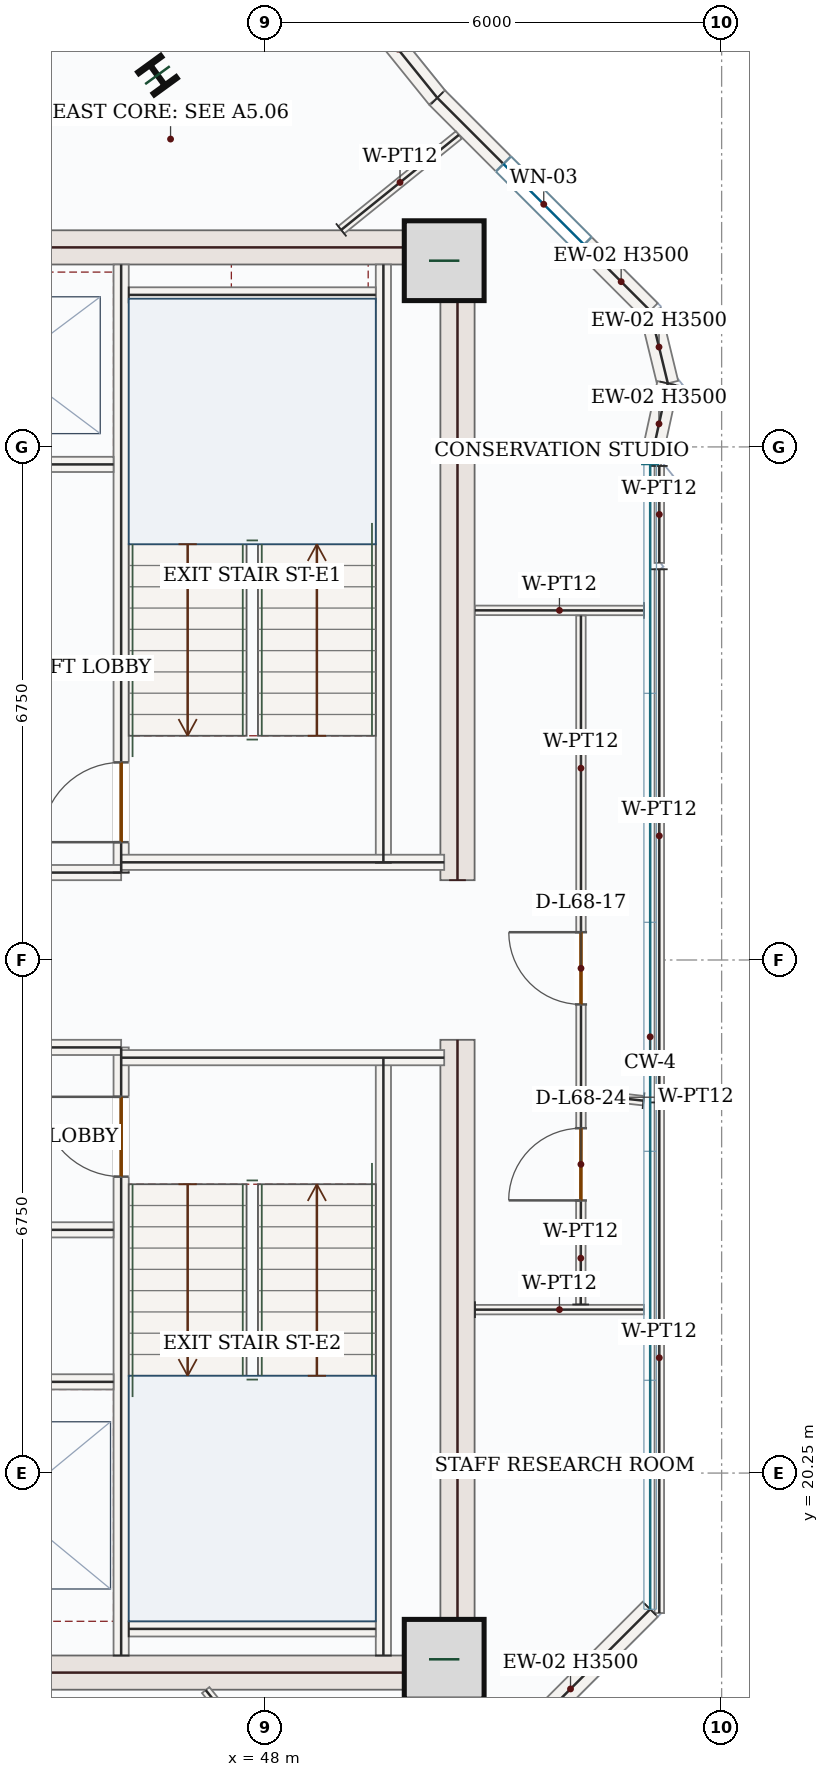
"""IFC4 building model, lengths in metres.
Left out: names, types, materials, properties, quantities, classifications, styles, units other than length and angle.
Written with IfcOpenShell. Run it as: python <this file> out.ifc"""

import sys

from ifc_helpers import new_model, si_unit, direction, frame, frame_2d, origin, origin_2d, place, context, subcontext, project, spatial, rectangle, i_section, extrude, source, transform, mapped, element, fill, save


model = new_model("IFC4")
c1 = context("Model", 3, precision=1e-05, world=origin(), true_north=direction((0.0, 1.0)))
c2 = subcontext(c1, "Body", "Model", "MODEL_VIEW")
j1 = project(units=[si_unit("LENGTHUNIT", "METRE"), si_unit("PLANEANGLEUNIT", "RADIAN")], contexts=[c1])
p1 = place(None, origin())
s1 = spatial("IfcSite", under=j1, at=p1, CompositionType="ELEMENT")
p2 = place(p1, origin())
s2 = spatial("IfcBuilding", under=s1, at=p2, CompositionType="ELEMENT")
p3 = place(p2, frame((0.0, 0.0, 284.1)))
s3 = spatial("IfcBuildingStorey", under=s2, at=p3, CompositionType="ELEMENT", Elevation=284.1)
m1 = source(origin(), c2, "Body", "SweptSolid", [
    extrude(rectangle(XDim=8.55, YDim=0.45, at=frame_2d((4.275, 0.0))), origin(), (0.0, 0.0, 1.0), 3.5),
])
for number, where, z_axis, x_axis in (
    (1, (50.525, 17.4, 0.0), (0.0, 0.0, 1.0), (0.0, 1.0, 0.0)),
    (2, (50.525, 28.05, 0.0), (0.0, 0.0, 1.0), (0.0, 1.0, 0.0)),
):
    element("IfcWall", number, at=place(p3, frame(where, z_axis=z_axis, x_axis=x_axis)), inside=s3, PredefinedType="SHEAR", context=c2, shape_type="MappedRepresentation", body=[
        mapped(m1, transform((0.0, 0.0, 0.0), x_axis=(1.0, 0.0, 0.0), y_axis=(0.0, 1.0, 0.0), z_axis=(0.0, 0.0, 1.0), scale=1.0)),
    ])
m2 = source(origin(), c2, "Body", "SweptSolid", [
    extrude(rectangle(XDim=7.1, YDim=0.45, at=frame_2d((3.55, 0.0))), origin(), (0.0, 0.0, 1.0), 3.5),
])
for number, where, z_axis, x_axis in (
    (3, (43.2, 17.625, 0.0), (0.0, 0.0, 1.0), (1.0, 0.0, 0.0)),
    (4, (43.2, 36.375, 0.0), (0.0, 0.0, 1.0), (1.0, 0.0, 0.0)),
):
    element("IfcWall", number, at=place(p3, frame(where, z_axis=z_axis, x_axis=x_axis)), inside=s3, PredefinedType="SHEAR", context=c2, shape_type="MappedRepresentation", body=[
        mapped(m2, transform((0.0, 0.0, 0.0), x_axis=(1.0, 0.0, 0.0), y_axis=(0.0, 1.0, 0.0), z_axis=(0.0, 0.0, 1.0), scale=1.0)),
    ])
m3 = source(origin(), c2, "Body", "SweptSolid", [
    extrude(rectangle(XDim=1.05, YDim=1.05, at=origin_2d()), origin(), (0.0, 0.0, 1.0), 3.75),
])
for number, where, z_axis, x_axis in (
    (5, (50.35, 17.8, 0.0), (0.0, 0.0, 1.0), (1.0, 0.0, 0.0)),
    (6, (50.35, 36.2, 0.0), (0.0, 0.0, 1.0), (1.0, 0.0, 0.0)),
):
    element("IfcColumn", number, at=place(p3, frame(where, z_axis=z_axis, x_axis=x_axis)), inside=s3, PredefinedType="COLUMN", context=c2, shape_type="MappedRepresentation", body=[
        mapped(m3, transform((0.0, 0.0, 0.0), x_axis=(1.0, 0.0, 0.0), y_axis=(0.0, 1.0, 0.0), z_axis=(0.0, 0.0, 1.0), scale=1.0)),
    ])
m4 = source(origin(), c2, "Body", "SweptSolid", [
    extrude(i_section(OverallWidth=0.374, OverallDepth=0.372, WebThickness=0.016, FlangeThickness=0.026, FilletRadius=0.018, at=origin_2d()), origin(), (0.0, 0.0, 1.0), 3.75),
])
p4 = place(p3, frame((46.578, 38.641, 0.0), z_axis=(0.0, 0.0, 1.0), x_axis=(0.809016994375, 0.587785252292, 0.0)))
e7 = element("IfcColumn", 7, at=p4, inside=s3, PredefinedType="COLUMN", context=c2, shape_type="MappedRepresentation", body=[
    mapped(m4, transform((0.0, 0.0, 0.0), x_axis=(1.0, 0.0, 0.0), y_axis=(0.0, 1.0, 0.0), z_axis=(0.0, 0.0, 1.0), scale=1.0)),
])
p5 = place(p3, frame((47.06, 42.305, 0.0), z_axis=(0.0, 0.0, 1.0), x_axis=(0.628225517447, -0.778031297075, 0.0)))
e8 = element("IfcWall", 8, at=p5, inside=s3, PredefinedType="SOLIDWALL", context=c2, shape_type="SweptSolid", body=[
    extrude(rectangle(XDim=5.093, YDim=0.28, at=frame_2d((2.546, 0.0))), origin(), (0.0, 0.0, 1.0), 3.5),
])
p6 = place(p5, frame((1.796, 0.0, 0.85)))
e9 = element("IfcOpeningElement", 9, at=p6, cuts=e8, PredefinedType="OPENING", context=c2, shape_type="SweptSolid", body=[
    extrude(rectangle(XDim=1.5, YDim=1.5, at=frame_2d((0.75, 0.75))), frame((0.0, 0.15, 0.0), z_axis=(0.0, -1.0, 0.0), x_axis=(1.0, 0.0, 0.0)), (0.0, 0.0, 1.0), 0.3),
])
p7 = place(p3, frame((50.26, 38.342, 0.0), z_axis=(0.0, 0.0, 1.0), x_axis=(0.707106781187, -0.707106781187, 0.0)))
e10 = element("IfcWall", 10, at=p7, inside=s3, PredefinedType="SOLIDWALL", context=c2, shape_type="SweptSolid", body=[
    extrude(rectangle(XDim=3.96, YDim=0.28, at=frame_2d((1.98, 0.0))), origin(), (0.0, 0.0, 1.0), 3.5),
])
p8 = place(p7, frame((1.23, 0.0, 0.85)))
e11 = element("IfcOpeningElement", 11, at=p8, cuts=e10, PredefinedType="OPENING", context=c2, shape_type="SweptSolid", body=[
    extrude(rectangle(XDim=1.5, YDim=1.5, at=frame_2d((0.75, 0.75))), frame((0.0, 0.15, 0.0), z_axis=(0.0, -1.0, 0.0), x_axis=(1.0, 0.0, 0.0)), (0.0, 0.0, 1.0), 0.3),
])
m5 = source(origin(), c2, "Body", "SweptSolid", [
    extrude(rectangle(XDim=0.983, YDim=0.28, at=frame_2d((0.492, 0.0))), origin(), (0.0, 0.0, 1.0), 3.5),
])
p9 = place(p3, frame((53.06, 35.542, 0.0), z_axis=(0.0, 0.0, 1.0), x_axis=(0.235870049888, -0.971784605541, 0.0)))
e12 = element("IfcWall", 12, at=p9, inside=s3, PredefinedType="SOLIDWALL", context=c2, shape_type="MappedRepresentation", body=[
    mapped(m5, transform((0.0, 0.0, 0.0), x_axis=(1.0, 0.0, 0.0), y_axis=(0.0, 1.0, 0.0), z_axis=(0.0, 0.0, 1.0), scale=1.0)),
])
m6 = source(origin(), c2, "Body", "SweptSolid", [
    extrude(rectangle(XDim=1.091, YDim=0.28, at=frame_2d((0.545, 0.0))), origin(), (0.0, 0.0, 1.0), 3.5),
])
p10 = place(p3, frame((53.292, 34.586, 0.0), z_axis=(0.0, 0.0, 1.0), x_axis=(-0.212661978508, -0.977125827566, 0.0)))
e13 = element("IfcWall", 13, at=p10, inside=s3, PredefinedType="SOLIDWALL", context=c2, shape_type="MappedRepresentation", body=[
    mapped(m6, transform((0.0, 0.0, 0.0), x_axis=(1.0, 0.0, 0.0), y_axis=(0.0, 1.0, 0.0), z_axis=(0.0, 0.0, 1.0), scale=1.0)),
])
m7 = source(origin(), c2, "Body", "SweptSolid", [
    extrude(rectangle(XDim=2.964, YDim=0.28, at=frame_2d((1.482, 0.0))), origin(), (0.0, 0.0, 1.0), 3.5),
])
p11 = place(p3, frame((53.06, 18.458, 0.0), z_axis=(0.0, 0.0, 1.0), x_axis=(-0.707106781187, -0.707106781187, 0.0)))
e14 = element("IfcWall", 14, at=p11, inside=s3, PredefinedType="SOLIDWALL", context=c2, shape_type="MappedRepresentation", body=[
    mapped(m7, transform((0.0, 0.0, 0.0), x_axis=(1.0, 0.0, 0.0), y_axis=(0.0, 1.0, 0.0), z_axis=(0.0, 0.0, 1.0), scale=1.0)),
])
m8 = source(origin(), c2, "Body", "SweptSolid", [
    extrude(rectangle(XDim=7.87, YDim=0.2, at=frame_2d((3.935, 0.0))), origin(), (0.0, 0.0, 1.0), 3.5),
])
for number, where, z_axis, x_axis in (
    (15, (49.55, 17.85, 0.0), (0.0, 0.0, 1.0), (0.0, 1.0, 0.0)),
    (16, (49.55, 28.28, 0.0), (0.0, 0.0, 1.0), (0.0, 1.0, 0.0)),
):
    element("IfcWall", number, at=place(p3, frame(where, z_axis=z_axis, x_axis=x_axis)), inside=s3, PredefinedType="SOLIDWALL", context=c2, shape_type="MappedRepresentation", body=[
        mapped(m8, transform((0.0, 0.0, 0.0), x_axis=(1.0, 0.0, 0.0), y_axis=(0.0, 1.0, 0.0), z_axis=(0.0, 0.0, 1.0), scale=1.0)),
    ])
p12 = place(p3, frame((46.1, 17.85, 0.0), z_axis=(0.0, 0.0, 1.0), x_axis=(0.0, 1.0, 0.0)))
e17 = element("IfcWall", 17, at=p12, inside=s3, PredefinedType="SOLIDWALL", context=c2, shape_type="SweptSolid", body=[
    extrude(rectangle(XDim=8.0, YDim=0.2, at=frame_2d((4.0, 0.0))), origin(), (0.0, 0.0, 1.0), 3.5),
])
p13 = place(p12, frame((6.3, 0.0, 0.0)))
e18 = element("IfcOpeningElement", 18, at=p13, cuts=e17, PredefinedType="OPENING", context=c2, shape_type="SweptSolid", body=[
    extrude(rectangle(XDim=1.05, YDim=2.15, at=frame_2d((0.525, 1.075))), frame((0.0, 0.11, 0.0), z_axis=(0.0, -1.0, 0.0), x_axis=(1.0, 0.0, 0.0)), (0.0, 0.0, 1.0), 0.22),
])
p14 = place(p3, frame((46.1, 28.15, 0.0), z_axis=(0.0, 0.0, 1.0), x_axis=(0.0, 1.0, 0.0)))
e19 = element("IfcWall", 19, at=p14, inside=s3, PredefinedType="SOLIDWALL", context=c2, shape_type="SweptSolid", body=[
    extrude(rectangle(XDim=8.0, YDim=0.2, at=frame_2d((4.0, 0.0))), origin(), (0.0, 0.0, 1.0), 3.5),
])
p15 = place(p14, frame((0.4, 0.0, 0.0)))
e20 = element("IfcOpeningElement", 20, at=p15, cuts=e19, PredefinedType="OPENING", context=c2, shape_type="SweptSolid", body=[
    extrude(rectangle(XDim=1.05, YDim=2.15, at=frame_2d((0.525, 1.075))), frame((0.0, 0.11, 0.0), z_axis=(0.0, -1.0, 0.0), x_axis=(1.0, 0.0, 0.0)), (0.0, 0.0, 1.0), 0.22),
])
m9 = source(origin(), c2, "Body", "SweptSolid", [
    extrude(rectangle(XDim=3.0, YDim=0.2, at=frame_2d((1.5, 0.0))), origin(), (0.0, 0.0, 1.0), 3.5),
])
p16 = place(p3, frame((43.1, 25.85, 0.0), z_axis=(0.0, 0.0, 1.0), x_axis=(1.0, 0.0, 0.0)))
e21 = element("IfcWall", 21, at=p16, inside=s3, PredefinedType="SOLIDWALL", context=c2, shape_type="MappedRepresentation", body=[
    mapped(m9, transform((0.0, 0.0, 0.0), x_axis=(1.0, 0.0, 0.0), y_axis=(0.0, 1.0, 0.0), z_axis=(0.0, 0.0, 1.0), scale=1.0)),
])
m10 = source(origin(), c2, "Body", "SweptSolid", [
    extrude(rectangle(XDim=4.25, YDim=0.2, at=frame_2d((2.125, 0.0))), origin(), (0.0, 0.0, 1.0), 3.5),
])
p17 = place(p3, frame((46.1, 25.715, 0.0), z_axis=(0.0, 0.0, 1.0), x_axis=(1.0, 0.0, 0.0)))
e22 = element("IfcWall", 22, at=p17, inside=s3, PredefinedType="SOLIDWALL", context=c2, shape_type="MappedRepresentation", body=[
    mapped(m10, transform((0.0, 0.0, 0.0), x_axis=(1.0, 0.0, 0.0), y_axis=(0.0, 1.0, 0.0), z_axis=(0.0, 0.0, 1.0), scale=1.0)),
])
p18 = place(p3, frame((43.1, 28.15, 0.0), z_axis=(0.0, 0.0, 1.0), x_axis=(1.0, 0.0, 0.0)))
e23 = element("IfcWall", 23, at=p18, inside=s3, PredefinedType="SOLIDWALL", context=c2, shape_type="MappedRepresentation", body=[
    mapped(m9, transform((0.0, 0.0, 0.0), x_axis=(1.0, 0.0, 0.0), y_axis=(0.0, 1.0, 0.0), z_axis=(0.0, 0.0, 1.0), scale=1.0)),
])
p19 = place(p3, frame((46.1, 28.285, 0.0), z_axis=(0.0, 0.0, 1.0), x_axis=(1.0, 0.0, 0.0)))
e24 = element("IfcWall", 24, at=p19, inside=s3, PredefinedType="SOLIDWALL", context=c2, shape_type="MappedRepresentation", body=[
    mapped(m10, transform((0.0, 0.0, 0.0), x_axis=(1.0, 0.0, 0.0), y_axis=(0.0, 1.0, 0.0), z_axis=(0.0, 0.0, 1.0), scale=1.0)),
])
m11 = source(origin(), c2, "Body", "SweptSolid", [
    extrude(rectangle(XDim=3.25, YDim=0.2, at=frame_2d((1.625, 0.0))), origin(), (0.0, 0.0, 1.0), 3.5),
])
for number, where, z_axis, x_axis in (
    (25, (46.2, 35.75, 0.0), (0.0, 0.0, 1.0), (1.0, 0.0, 0.0)),
    (26, (46.2, 18.2, 0.0), (0.0, 0.0, 1.0), (1.0, 0.0, 0.0)),
):
    element("IfcWall", number, at=place(p3, frame(where, z_axis=z_axis, x_axis=x_axis)), inside=s3, PredefinedType="SOLIDWALL", context=c2, shape_type="MappedRepresentation", body=[
        mapped(m11, transform((0.0, 0.0, 0.0), x_axis=(1.0, 0.0, 0.0), y_axis=(0.0, 1.0, 0.0), z_axis=(0.0, 0.0, 1.0), scale=1.0)),
    ])
p20 = place(p3, frame((43.25, 33.52, 0.0), z_axis=(0.0, 0.0, 1.0), x_axis=(1.0, 0.0, 0.0)))
e27 = element("IfcWall", 27, at=p20, inside=s3, PredefinedType="SOLIDWALL", context=c2, shape_type="SweptSolid", body=[
    extrude(rectangle(XDim=2.75, YDim=0.2, at=frame_2d((1.375, 0.0))), origin(), (0.0, 0.0, 1.0), 3.5),
])
p21 = place(p20, frame((0.82, 0.0, 0.0)))
e28 = element("IfcOpeningElement", 28, at=p21, cuts=e27, PredefinedType="OPENING", context=c2, shape_type="SweptSolid", body=[
    extrude(rectangle(XDim=1.1, YDim=2.15, at=frame_2d((0.55, 1.075))), frame((0.0, 0.11, 0.0), z_axis=(0.0, -1.0, 0.0), x_axis=(1.0, 0.0, 0.0)), (0.0, 0.0, 1.0), 0.22),
])
m12 = source(origin(), c2, "Body", "SweptSolid", [
    extrude(rectangle(XDim=2.75, YDim=0.2, at=frame_2d((1.375, 0.0))), origin(), (0.0, 0.0, 1.0), 3.5),
])
for number, where, z_axis, x_axis in (
    (29, (43.25, 23.45, 0.0), (0.0, 0.0, 1.0), (1.0, 0.0, 0.0)),
    (30, (43.25, 21.45, 0.0), (0.0, 0.0, 1.0), (1.0, 0.0, 0.0)),
):
    element("IfcWall", number, at=place(p3, frame(where, z_axis=z_axis, x_axis=x_axis)), inside=s3, PredefinedType="SOLIDWALL", context=c2, shape_type="MappedRepresentation", body=[
        mapped(m12, transform((0.0, 0.0, 0.0), x_axis=(1.0, 0.0, 0.0), y_axis=(0.0, 1.0, 0.0), z_axis=(0.0, 0.0, 1.0), scale=1.0)),
    ])
m13 = source(origin(), c2, "Body", "SweptSolid", [
    extrude(rectangle(XDim=2.223, YDim=0.125, at=frame_2d((1.111, 0.0))), origin(), (0.0, 0.0, 1.0), 3.5),
])
p22 = place(p3, frame((52.978, 31.598, 0.0), z_axis=(0.0, 0.0, 1.0), x_axis=(-0.999999704402, 0.000768892567, 0.0)))
e31 = element("IfcWall", 31, at=p22, inside=s3, PredefinedType="PARTITIONING", context=c2, shape_type="MappedRepresentation", body=[
    mapped(m13, transform((0.0, 0.0, 0.0), x_axis=(1.0, 0.0, 0.0), y_axis=(0.0, 1.0, 0.0), z_axis=(0.0, 0.0, 1.0), scale=1.0)),
])
m14 = source(origin(), c2, "Body", "SweptSolid", [
    extrude(rectangle(XDim=1.989, YDim=0.125, at=frame_2d((0.995, 0.0))), origin(), (0.0, 0.0, 1.0), 3.5),
])
p23 = place(p3, frame((48.995, 36.605, 0.0), z_axis=(0.0, 0.0, 1.0), x_axis=(0.778058853423, 0.628191388519, 0.0)))
e32 = element("IfcWall", 32, at=p23, inside=s3, PredefinedType="PARTITIONING", context=c2, shape_type="MappedRepresentation", body=[
    mapped(m14, transform((0.0, 0.0, 0.0), x_axis=(1.0, 0.0, 0.0), y_axis=(0.0, 1.0, 0.0), z_axis=(0.0, 0.0, 1.0), scale=1.0)),
])
m15 = source(origin(), c2, "Body", "SweptSolid", [
    extrude(rectangle(XDim=1.276, YDim=0.125, at=frame_2d((0.638, 0.0))), origin(), (0.0, 0.0, 1.0), 3.5),
])
p24 = place(p3, frame((53.18, 33.5, 0.0), z_axis=(0.0, 0.0, 1.0), x_axis=(0.0, -1.0, 0.0)))
e33 = element("IfcWall", 33, at=p24, inside=s3, PredefinedType="PARTITIONING", context=c2, shape_type="MappedRepresentation", body=[
    mapped(m15, transform((0.0, 0.0, 0.0), x_axis=(1.0, 0.0, 0.0), y_axis=(0.0, 1.0, 0.0), z_axis=(0.0, 0.0, 1.0), scale=1.0)),
])
m16 = source(origin(), c2, "Body", "SweptSolid", [
    extrude(rectangle(XDim=7.014, YDim=0.125, at=frame_2d((3.507, 0.0))), origin(), (0.0, 0.0, 1.0), 3.5),
])
p25 = place(p3, frame((53.18, 32.14, 0.0), z_axis=(0.0, 0.0, 1.0), x_axis=(0.0, -1.0, 0.0)))
e34 = element("IfcWall", 34, at=p25, inside=s3, PredefinedType="PARTITIONING", context=c2, shape_type="MappedRepresentation", body=[
    mapped(m16, transform((0.0, 0.0, 0.0), x_axis=(1.0, 0.0, 0.0), y_axis=(0.0, 1.0, 0.0), z_axis=(0.0, 0.0, 1.0), scale=1.0)),
])
m17 = source(origin(), c2, "Body", "SweptSolid", [
    extrude(rectangle(XDim=0.828, YDim=0.125, at=frame_2d((0.414, 0.0))), origin(), (0.0, 0.0, 1.0), 3.5),
])
p26 = place(p3, frame((52.972, 25.149, 0.0), z_axis=(0.0, 0.0, 1.0), x_axis=(-0.993862130166, 0.110625793652, 0.0)))
e35 = element("IfcWall", 35, at=p26, inside=s3, PredefinedType="PARTITIONING", context=c2, shape_type="MappedRepresentation", body=[
    mapped(m17, transform((0.0, 0.0, 0.0), x_axis=(1.0, 0.0, 0.0), y_axis=(0.0, 1.0, 0.0), z_axis=(0.0, 0.0, 1.0), scale=1.0)),
])
p27 = place(p3, frame((52.15, 25.24, 0.0), z_axis=(0.0, 0.0, 1.0), x_axis=(-0.000155231293, 0.999999987952, 0.0)))
e36 = element("IfcWall", 36, at=p27, inside=s3, PredefinedType="PARTITIONING", context=c2, shape_type="SweptSolid", body=[
    extrude(rectangle(XDim=6.291, YDim=0.125, at=frame_2d((3.146, 0.0))), origin(), (0.0, 0.0, 1.0), 3.5),
])
p28 = place(p27, frame((1.175, 0.0, 0.0)))
e37 = element("IfcOpeningElement", 37, at=p28, cuts=e36, PredefinedType="OPENING", context=c2, shape_type="SweptSolid", body=[
    extrude(rectangle(XDim=0.95, YDim=2.15, at=frame_2d((0.475, 1.075))), frame((0.0, 0.073, 0.0), z_axis=(0.0, -1.0, 0.0), x_axis=(1.0, 0.0, 0.0)), (0.0, 0.0, 1.0), 0.145),
])
m18 = source(origin(), c2, "Body", "SweptSolid", [
    extrude(rectangle(XDim=2.089, YDim=0.125, at=frame_2d((1.045, 0.0))), origin(), (0.0, 0.0, 1.0), 3.5),
])
p29 = place(p3, frame((48.525, 15.769, 0.0), z_axis=(0.0, 0.0, 1.0), x_axis=(-0.628165745158, 0.778079556735, 0.0)))
e38 = element("IfcWall", 38, at=p29, inside=s3, PredefinedType="PARTITIONING", context=c2, shape_type="MappedRepresentation", body=[
    mapped(m18, transform((0.0, 0.0, 0.0), x_axis=(1.0, 0.0, 0.0), y_axis=(0.0, 1.0, 0.0), z_axis=(0.0, 0.0, 1.0), scale=1.0)),
])
p30 = place(p3, frame((50.755, 22.4, 0.0), z_axis=(0.0, 0.0, 1.0), x_axis=(0.999999903478, 0.000439367269, 0.0)))
e39 = element("IfcWall", 39, at=p30, inside=s3, PredefinedType="PARTITIONING", context=c2, shape_type="MappedRepresentation", body=[
    mapped(m13, transform((0.0, 0.0, 0.0), x_axis=(1.0, 0.0, 0.0), y_axis=(0.0, 1.0, 0.0), z_axis=(0.0, 0.0, 1.0), scale=1.0)),
])
p31 = place(p3, frame((52.146, 22.468, 0.0), z_axis=(0.0, 0.0, 1.0), x_axis=(0.001263765014, 0.999999201449, 0.0)))
e40 = element("IfcWall", 40, at=p31, inside=s3, PredefinedType="PARTITIONING", context=c2, shape_type="SweptSolid", body=[
    extrude(rectangle(XDim=2.705, YDim=0.125, at=frame_2d((1.352, 0.0))), origin(), (0.0, 0.0, 1.0), 3.5),
])
p32 = place(p31, frame((1.369, 0.0, 0.0)))
e41 = element("IfcOpeningElement", 41, at=p32, cuts=e40, PredefinedType="OPENING", context=c2, shape_type="SweptSolid", body=[
    extrude(rectangle(XDim=0.95, YDim=2.15, at=frame_2d((0.475, 1.075))), frame((0.0, 0.073, 0.0), z_axis=(0.0, -1.0, 0.0), x_axis=(1.0, 0.0, 0.0)), (0.0, 0.0, 1.0), 0.145),
])
m19 = source(origin(), c2, "Body", "SweptSolid", [
    extrude(rectangle(XDim=6.718, YDim=0.125, at=frame_2d((3.359, 0.0))), origin(), (0.0, 0.0, 1.0), 3.5),
])
p33 = place(p3, frame((53.18, 25.126, 0.0), z_axis=(0.0, 0.0, 1.0), x_axis=(0.0, -1.0, 0.0)))
e42 = element("IfcWall", 42, at=p33, inside=s3, PredefinedType="PARTITIONING", context=c2, shape_type="MappedRepresentation", body=[
    mapped(m19, transform((0.0, 0.0, 0.0), x_axis=(1.0, 0.0, 0.0), y_axis=(0.0, 1.0, 0.0), z_axis=(0.0, 0.0, 1.0), scale=1.0)),
])
m20 = source(origin(), c2, "Body", "SweptSolid", [
    extrude(rectangle(XDim=1.5, YDim=1.5, at=frame_2d((0.75, 0.75))), frame((0.0, 0.03, 0.0), z_axis=(0.0, -1.0, 0.0), x_axis=(1.0, 0.0, 0.0)), (0.0, 0.0, 1.0), 0.06),
])
p34 = place(p8, origin())
e43 = element("IfcWindow", 43, at=p34, inside=s3, PartitioningType="SINGLE_PANEL", PredefinedType="WINDOW", context=c2, shape_type="MappedRepresentation", body=[
    mapped(m20, transform((0.0, 0.0, 0.0), x_axis=(1.0, 0.0, 0.0), y_axis=(0.0, 1.0, 0.0), z_axis=(0.0, 0.0, 1.0), scale=1.0)),
])
fill(e11, e43)
m21 = source(origin(), c2, "Body", "SweptSolid", [
    extrude(rectangle(XDim=1.05, YDim=2.15, at=frame_2d((0.525, 1.075))), frame((0.0, 0.025, 0.0), z_axis=(0.0, -1.0, 0.0), x_axis=(1.0, 0.0, 0.0)), (0.0, 0.0, 1.0), 0.05),
])
p35 = place(p15, origin())
e44 = element("IfcDoor", 44, at=p35, inside=s3, OperationType="SINGLE_SWING_LEFT", PredefinedType="DOOR", context=c2, shape_type="MappedRepresentation", body=[
    mapped(m21, transform((0.0, 0.0, 0.0), x_axis=(1.0, 0.0, 0.0), y_axis=(0.0, 1.0, 0.0), z_axis=(0.0, 0.0, 1.0), scale=1.0)),
])
fill(e20, e44)
p36 = place(p13, origin())
e45 = element("IfcDoor", 45, at=p36, inside=s3, OperationType="SINGLE_SWING_RIGHT", PredefinedType="DOOR", context=c2, shape_type="MappedRepresentation", body=[
    mapped(m21, transform((0.0, 0.0, 0.0), x_axis=(1.0, 0.0, 0.0), y_axis=(0.0, 1.0, 0.0), z_axis=(0.0, 0.0, 1.0), scale=1.0)),
])
fill(e18, e45)
m22 = source(origin(), c2, "Body", "SweptSolid", [
    extrude(rectangle(XDim=0.95, YDim=2.15, at=frame_2d((0.475, 1.075))), frame((0.0, 0.025, 0.0), z_axis=(0.0, -1.0, 0.0), x_axis=(1.0, 0.0, 0.0)), (0.0, 0.0, 1.0), 0.05),
])
p37 = place(p28, origin())
e46 = element("IfcDoor", 46, at=p37, inside=s3, OperationType="SINGLE_SWING_RIGHT", PredefinedType="DOOR", context=c2, shape_type="MappedRepresentation", body=[
    mapped(m22, transform((0.0, 0.0, 0.0), x_axis=(1.0, 0.0, 0.0), y_axis=(0.0, 1.0, 0.0), z_axis=(0.0, 0.0, 1.0), scale=1.0)),
])
fill(e37, e46)
p38 = place(p32, origin())
e47 = element("IfcDoor", 47, at=p38, inside=s3, OperationType="SINGLE_SWING_LEFT", PredefinedType="DOOR", context=c2, shape_type="MappedRepresentation", body=[
    mapped(m22, transform((0.0, 0.0, 0.0), x_axis=(1.0, 0.0, 0.0), y_axis=(0.0, 1.0, 0.0), z_axis=(0.0, 0.0, 1.0), scale=1.0)),
])
fill(e41, e47)
save(model, sys.argv[1])
